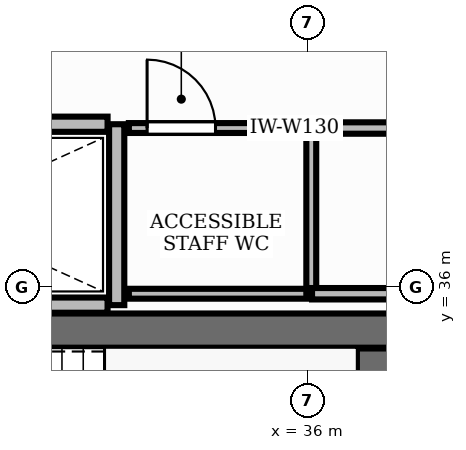
"""IFC4 building model, lengths in metres.
Left out: names, types, materials, properties, quantities, classifications, styles, units other than length and angle.
Written with IfcOpenShell. Run it as: python <this file> out.ifc"""

import sys

from ifc_helpers import new_model, si_unit, direction, frame, frame_2d, origin, place, context, subcontext, project, spatial, rectangle, extrude, element, fill, save


model = new_model("IFC4")
c1 = context("Model", 3, precision=1e-05, world=origin(), true_north=direction((0.0, 1.0)))
c2 = subcontext(c1, "Body", "Model", "MODEL_VIEW")
j1 = project(units=[si_unit("LENGTHUNIT", "METRE"), si_unit("PLANEANGLEUNIT", "RADIAN")], contexts=[c1])
p1 = place(None, origin())
s1 = spatial("IfcSite", under=j1, at=p1, CompositionType="ELEMENT")
p2 = place(p1, origin())
s2 = spatial("IfcBuilding", under=s1, at=p2, CompositionType="ELEMENT")
p3 = place(p2, frame((0.0, 0.0, 111.0)))
s3 = spatial("IfcBuildingStorey", under=s2, at=p3, CompositionType="ELEMENT", Elevation=111.0)
p4 = place(p3, frame((28.852, 35.425, 0.0), z_axis=(0.0, 0.0, 1.0), x_axis=(1.0, 0.0, 0.0)))
e1 = element("IfcWall", 1, at=p4, inside=s3, PredefinedType="SHEAR", context=c2, shape_type="SweptSolid", body=[
    extrude(rectangle(XDim=8.248, YDim=0.45, at=frame_2d((4.124, 0.0))), origin(), (0.0, 0.0, 1.0), 3.9),
])
p5 = place(p3, frame((36.875, 32.11, 0.0), z_axis=(0.0, 0.0, 1.0), x_axis=(0.0, 1.0, 0.0)))
e2 = element("IfcWall", 2, at=p5, inside=s3, PredefinedType="SHEAR", context=c2, shape_type="SweptSolid", body=[
    extrude(rectangle(XDim=3.08, YDim=0.45, at=frame_2d((1.54, 0.0))), origin(), (0.0, 0.0, 1.0), 3.9),
])
p6 = place(p3, frame((33.49, 35.76, 0.0), z_axis=(0.0, 0.0, 1.0), x_axis=(0.0, 1.0, 0.0)))
e3 = element("IfcWall", 3, at=p6, inside=s3, PredefinedType="PARTITIONING", context=c2, shape_type="SweptSolid", body=[
    extrude(rectangle(XDim=2.38, YDim=0.2, at=frame_2d((1.19, 0.0))), origin(), (0.0, 0.0, 1.0), 2.91),
])
for number, where, z_axis, x_axis in (
    (4, (28.8, 35.76, 0.0), (0.0, 0.0, 1.0), (1.0, 0.0, 0.0)),
    (5, (28.8, 38.14, 0.0), (0.0, 0.0, 1.0), (1.0, 0.0, 0.0)),
):
    element("IfcWall", number, at=place(p3, frame(where, z_axis=z_axis, x_axis=x_axis)), inside=s3, PredefinedType="PARTITIONING", context=c2, shape_type="SweptSolid", body=[
        extrude(rectangle(XDim=4.57, YDim=0.2, at=frame_2d((2.285, 0.0))), origin(), (0.0, 0.0, 1.0), 2.91),
    ])
p7 = place(p3, frame((33.65, 38.09, 0.0), z_axis=(0.0, 0.0, 1.0), x_axis=(1.0, 0.0, 0.0)))
e6 = element("IfcWall", 6, at=p7, inside=s3, PredefinedType="PARTITIONING", context=c2, shape_type="SweptSolid", body=[
    extrude(rectangle(XDim=2.4, YDim=0.13, at=frame_2d((1.2, 0.0))), origin(), (0.0, 0.0, 1.0), 2.91),
])
p8 = place(p7, frame((0.24, 0.0, 0.0)))
e7 = element("IfcOpeningElement", 7, at=p8, cuts=e6, PredefinedType="OPENING", context=c2, shape_type="SweptSolid", body=[
    extrude(rectangle(XDim=0.9, YDim=2.15, at=frame_2d((0.45, 1.075))), frame((0.0, 0.08, 0.0), z_axis=(0.0, -1.0, 0.0), x_axis=(1.0, 0.0, 0.0)), (0.0, 0.0, 1.0), 0.16),
])
p9 = place(p3, frame((36.05, 35.91, 0.0), z_axis=(0.0, 0.0, 1.0), x_axis=(-1.0, 0.0, 0.0)))
e8 = element("IfcWall", 8, at=p9, inside=s3, PredefinedType="PARTITIONING", context=c2, shape_type="SweptSolid", body=[
    extrude(rectangle(XDim=2.4, YDim=0.13, at=frame_2d((1.2, 0.0))), origin(), (0.0, 0.0, 1.0), 2.91),
])
p10 = place(p3, frame((36.05, 38.09, 0.0), z_axis=(0.0, 0.0, 1.0), x_axis=(0.0, -1.0, 0.0)))
e9 = element("IfcWall", 9, at=p10, inside=s3, PredefinedType="PARTITIONING", context=c2, shape_type="SweptSolid", body=[
    extrude(rectangle(XDim=2.18, YDim=0.13, at=frame_2d((1.09, 0.0))), origin(), (0.0, 0.0, 1.0), 2.91),
])
p11 = place(p3, frame((36.06, 38.09, 0.0), z_axis=(0.0, 0.0, 1.0), x_axis=(1.0, 0.0, 0.0)))
e10 = element("IfcWall", 10, at=p11, inside=s3, PredefinedType="PARTITIONING", context=c2, shape_type="SweptSolid", body=[
    extrude(rectangle(XDim=1.14, YDim=0.15, at=frame_2d((0.57, 0.0))), origin(), (0.0, 0.0, 1.0), 2.91),
])
p12 = place(p3, frame((37.35, 35.91, 0.0), z_axis=(0.0, 0.0, 1.0), x_axis=(-1.0, 0.0, 0.0)))
e11 = element("IfcWall", 11, at=p12, inside=s3, PredefinedType="PARTITIONING", context=c2, shape_type="SweptSolid", body=[
    extrude(rectangle(XDim=1.29, YDim=0.15, at=frame_2d((0.645, 0.0))), origin(), (0.0, 0.0, 1.0), 2.91),
])
p13 = place(p8, origin())
e12 = element("IfcDoor", 12, at=p13, inside=s3, OperationType="SINGLE_SWING_LEFT", PredefinedType="DOOR", context=c2, shape_type="SweptSolid", body=[
    extrude(rectangle(XDim=0.9, YDim=2.15, at=frame_2d((0.45, 1.075))), frame((0.0, 0.025, 0.0), z_axis=(0.0, -1.0, 0.0), x_axis=(1.0, 0.0, 0.0)), (0.0, 0.0, 1.0), 0.05),
])
fill(e7, e12)
save(model, sys.argv[1])
